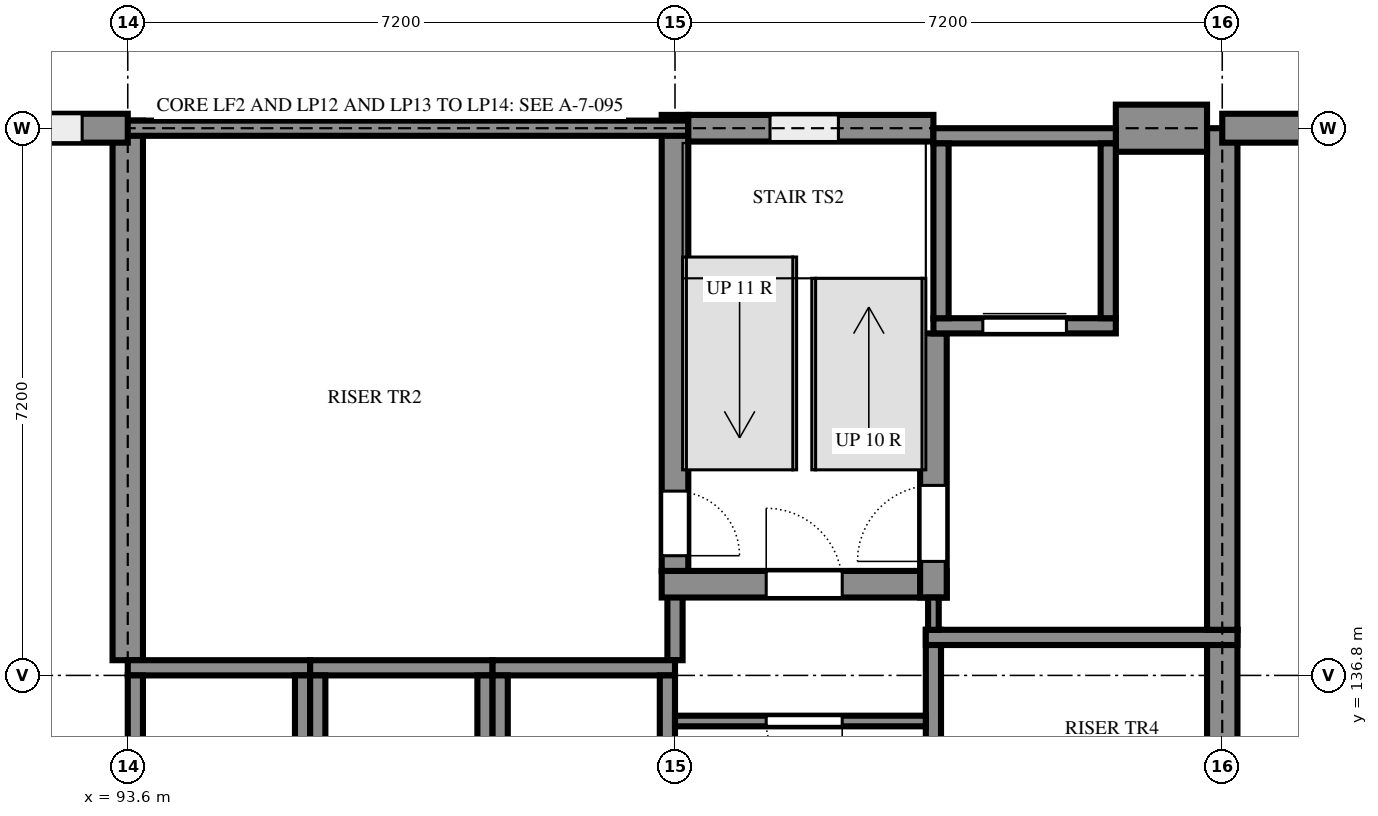
"""IFC4 building model, lengths in metres.
Left out: names, types, materials, properties, quantities, classifications, styles, units other than length and angle.
Written with IfcOpenShell. Run it as: python <this file> out.ifc"""

import sys

from ifc_helpers import new_model, si_unit, direction, frame, frame_2d, origin, place, context, subcontext, project, spatial, rectangle, extrude, element, fill, save


model = new_model("IFC4")
c1 = context("Model", 3, precision=1e-05, world=origin(), true_north=direction((0.0, 1.0)))
c2 = subcontext(c1, "Body", "Model", "MODEL_VIEW")
j1 = project(units=[si_unit("LENGTHUNIT", "METRE"), si_unit("PLANEANGLEUNIT", "RADIAN")], contexts=[c1])
p1 = place(None, origin())
s1 = spatial("IfcSite", under=j1, at=p1, CompositionType="ELEMENT")
p2 = place(p1, origin())
s2 = spatial("IfcBuilding", under=s1, at=p2, CompositionType="ELEMENT")
p3 = place(p2, frame((0.0, 0.0, 14.4)))
s3 = spatial("IfcBuildingStorey", under=s2, at=p3, CompositionType="ELEMENT", Elevation=14.4)
p4 = place(p3, frame((108.0, 134.5, 0.0), z_axis=(0.0, 0.0, 1.0), x_axis=(0.0, 1.0, 0.0)))
e1 = element("IfcWall", 1, at=p4, inside=s3, PredefinedType="SHEAR", context=c2, shape_type="SweptSolid", body=[
    extrude(rectangle(XDim=2.9, YDim=0.4, at=frame_2d((1.45, 0.0))), origin(), (0.0, 0.0, 1.0), 3.6),
])
p5 = place(p3, frame((100.8, 137.0, 0.0), z_axis=(0.0, 0.0, 1.0), x_axis=(0.0, 1.0, 0.0)))
e2 = element("IfcWall", 2, at=p5, inside=s3, PredefinedType="SHEAR", context=c2, shape_type="SweptSolid", body=[
    extrude(rectangle(XDim=1.175, YDim=0.2, at=frame_2d((0.587, 0.0))), origin(), (0.0, 0.0, 1.0), 3.6),
])
p6 = place(p3, frame((104.2, 137.4, 0.0), z_axis=(0.0, 0.0, 1.0), x_axis=(0.0, -1.0, 0.0)))
e3 = element("IfcWall", 3, at=p6, inside=s3, PredefinedType="SHEAR", context=c2, shape_type="SweptSolid", body=[
    extrude(rectangle(XDim=3.1, YDim=0.2, at=frame_2d((1.55, 0.0))), origin(), (0.0, 0.0, 1.0), 3.6),
])
p7 = place(p3, frame((108.2, 137.3, 0.0), z_axis=(0.0, 0.0, 1.0), x_axis=(-1.0, 0.0, 0.0)))
e4 = element("IfcWall", 4, at=p7, inside=s3, PredefinedType="SHEAR", context=c2, shape_type="SweptSolid", body=[
    extrude(rectangle(XDim=4.1, YDim=0.2, at=frame_2d((2.05, 0.0))), origin(), (0.0, 0.0, 1.0), 3.6),
])
p8 = place(p3, frame((108.0, 137.4, 0.0), z_axis=(0.0, 0.0, 1.0), x_axis=(0.0, 1.0, 0.0)))
e5 = element("IfcWall", 5, at=p8, inside=s3, PredefinedType="SHEAR", context=c2, shape_type="SweptSolid", body=[
    extrude(rectangle(XDim=6.6, YDim=0.4, at=frame_2d((3.3, 0.0))), origin(), (0.0, 0.0, 1.0), 3.6),
])
p9 = place(p3, frame((100.625, 138.0, 0.0), z_axis=(0.0, 0.0, 1.0), x_axis=(1.0, 0.0, 0.0)))
e6 = element("IfcWall", 6, at=p9, inside=s3, PredefinedType="SHEAR", context=c2, shape_type="SweptSolid", body=[
    extrude(rectangle(XDim=3.75, YDim=0.35, at=frame_2d((1.875, 0.0))), origin(), (0.0, 0.0, 1.0), 3.6),
])
p10 = place(p9, frame((1.375, 0.0, 0.0)))
e7 = element("IfcOpeningElement", 7, at=p10, cuts=e6, PredefinedType="OPENING", context=c2, shape_type="SweptSolid", body=[
    extrude(rectangle(XDim=1.0, YDim=2.1, at=frame_2d((0.5, 1.05))), frame((0.0, 0.185, 0.0), z_axis=(0.0, -1.0, 0.0), x_axis=(1.0, 0.0, 0.0)), (0.0, 0.0, 1.0), 0.37),
])
p11 = place(p3, frame((104.2, 137.825, 0.0), z_axis=(0.0, 0.0, 1.0), x_axis=(0.0, 1.0, 0.0)))
e8 = element("IfcWall", 8, at=p11, inside=s3, PredefinedType="SHEAR", context=c2, shape_type="SweptSolid", body=[
    extrude(rectangle(XDim=3.475, YDim=0.35, at=frame_2d((1.738, 0.0))), origin(), (0.0, 0.0, 1.0), 3.6),
])
p12 = place(p11, frame((0.475, 0.0, 0.0)))
e9 = element("IfcOpeningElement", 9, at=p12, cuts=e8, PredefinedType="OPENING", context=c2, shape_type="SweptSolid", body=[
    extrude(rectangle(XDim=1.0, YDim=2.1, at=frame_2d((0.5, 1.05))), frame((0.0, 0.185, 0.0), z_axis=(0.0, -1.0, 0.0), x_axis=(1.0, 0.0, 0.0)), (0.0, 0.0, 1.0), 0.37),
])
p13 = place(p3, frame((93.6, 144.1, 0.0), z_axis=(0.0, 0.0, 1.0), x_axis=(0.0, -1.0, 0.0)))
e10 = element("IfcWall", 10, at=p13, inside=s3, PredefinedType="SHEAR", context=c2, shape_type="SweptSolid", body=[
    extrude(rectangle(XDim=7.1, YDim=0.4, at=frame_2d((3.55, 0.0))), origin(), (0.0, 0.0, 1.0), 3.6),
])
p14 = place(p3, frame((100.8, 144.175, 0.0), z_axis=(0.0, 0.0, 1.0), x_axis=(0.0, -1.0, 0.0)))
e11 = element("IfcWall", 11, at=p14, inside=s3, PredefinedType="SHEAR", context=c2, shape_type="SweptSolid", body=[
    extrude(rectangle(XDim=6.0, YDim=0.35, at=frame_2d((3.0, 0.0))), origin(), (0.0, 0.0, 1.0), 3.6),
])
p15 = place(p14, frame((4.95, 0.0, 0.0)))
e12 = element("IfcOpeningElement", 12, at=p15, cuts=e11, PredefinedType="OPENING", context=c2, shape_type="SweptSolid", body=[
    extrude(rectangle(XDim=0.85, YDim=2.1, at=frame_2d((0.425, 1.05))), frame((0.0, 0.185, 0.0), z_axis=(0.0, -1.0, 0.0), x_axis=(1.0, 0.0, 0.0)), (0.0, 0.0, 1.0), 0.37),
])
p16 = place(p3, frame((100.975, 144.0, 0.0), z_axis=(0.0, 0.0, 1.0), x_axis=(-1.0, 0.0, 0.0)))
e13 = element("IfcWall", 13, at=p16, inside=s3, PredefinedType="SHEAR", context=c2, shape_type="SweptSolid", body=[
    extrude(rectangle(XDim=7.575, YDim=0.2, at=frame_2d((3.788, 0.0))), origin(), (0.0, 0.0, 1.0), 3.6),
])
p17 = place(p3, frame((104.2, 144.0, 0.0), z_axis=(0.0, 0.0, 1.0), x_axis=(-1.0, 0.0, 0.0)))
e14 = element("IfcWall", 14, at=p17, inside=s3, PredefinedType="SHEAR", context=c2, shape_type="SweptSolid", body=[
    extrude(rectangle(XDim=3.225, YDim=0.35, at=frame_2d((1.612, 0.0))), origin(), (0.0, 0.0, 1.0), 3.6),
])
p18 = place(p17, frame((1.25, 0.0, 0.6)))
e15 = element("IfcOpeningElement", 15, at=p18, cuts=e14, PredefinedType="OPENING", context=c2, shape_type="SweptSolid", body=[
    extrude(rectangle(XDim=0.9, YDim=2.1, at=frame_2d((0.45, 1.05))), frame((0.0, 0.185, 0.0), z_axis=(0.0, -1.0, 0.0), x_axis=(1.0, 0.0, 0.0)), (0.0, 0.0, 1.0), 0.37),
])
p19 = place(p3, frame((115.046, 144.0, 0.0), z_axis=(0.0, 0.0, 1.0), x_axis=(-1.0, 0.0, 0.0)))
e16 = element("IfcWall", 16, at=p19, inside=s3, PredefinedType="SOLIDWALL", context=c2, shape_type="SweptSolid", body=[
    extrude(rectangle(XDim=7.046, YDim=0.38, at=frame_2d((3.523, 0.0))), origin(), (0.0, 0.0, 1.0), 3.16),
])
p20 = place(p3, frame((107.8, 144.0, 0.0), z_axis=(0.0, 0.0, 1.0), x_axis=(-1.0, 0.0, 0.0)))
e17 = element("IfcWall", 17, at=p20, inside=s3, PredefinedType="SOLIDWALL", context=c2, shape_type="SweptSolid", body=[
    extrude(rectangle(XDim=1.2, YDim=0.62, at=frame_2d((0.6, 0.0))), origin(), (0.0, 0.0, 1.0), 3.46),
])
p21 = place(p3, frame((93.6, 144.0, 0.0), z_axis=(0.0, 0.0, 1.0), x_axis=(-1.0, 0.0, 0.0)))
e18 = element("IfcWall", 18, at=p21, inside=s3, PredefinedType="SOLIDWALL", context=c2, shape_type="SweptSolid", body=[
    extrude(rectangle(XDim=7.047, YDim=0.38, at=frame_2d((3.523, 0.0))), origin(), (0.0, 0.0, 1.0), 3.16),
])
p22 = place(p21, frame((4.2, 0.0, 0.6)))
e19 = element("IfcOpeningElement", 19, at=p22, cuts=e18, PredefinedType="OPENING", context=c2, shape_type="SweptSolid", body=[
    extrude(rectangle(XDim=2.4, YDim=2.4, at=frame_2d((1.2, 1.2))), frame((0.0, 0.2, 0.0), z_axis=(0.0, -1.0, 0.0), x_axis=(1.0, 0.0, 0.0)), (0.0, 0.0, 1.0), 0.4),
])
p23 = place(p21, frame((0.6, 0.0, 0.6)))
e20 = element("IfcOpeningElement", 20, at=p23, cuts=e18, PredefinedType="OPENING", context=c2, shape_type="SweptSolid", body=[
    extrude(rectangle(XDim=2.4, YDim=2.4, at=frame_2d((1.2, 1.2))), frame((0.0, 0.2, 0.0), z_axis=(0.0, -1.0, 0.0), x_axis=(1.0, 0.0, 0.0)), (0.0, 0.0, 1.0), 0.4),
])
p24 = place(p3, frame((93.6, 136.9, 0.0), z_axis=(0.0, 0.0, 1.0), x_axis=(1.0, 0.0, 0.0)))
e21 = element("IfcWall", 21, at=p24, inside=s3, PredefinedType="SHEAR", context=c2, shape_type="SweptSolid", body=[
    extrude(rectangle(XDim=2.4, YDim=0.2, at=frame_2d((1.2, 0.0))), origin(), (0.0, 0.0, 1.0), 3.6),
])
for number, where, z_axis, x_axis in (
    (22, (93.7, 134.6, 0.0), (0.0, 0.0, 1.0), (0.0, 1.0, 0.0)),
    (23, (95.9, 134.6, 0.0), (0.0, 0.0, 1.0), (0.0, 1.0, 0.0)),
):
    element("IfcWall", number, at=place(p3, frame(where, z_axis=z_axis, x_axis=x_axis)), inside=s3, PredefinedType="SHEAR", context=c2, shape_type="SweptSolid", body=[
        extrude(rectangle(XDim=2.2, YDim=0.2, at=frame_2d((1.1, 0.0))), origin(), (0.0, 0.0, 1.0), 3.6),
    ])
p25 = place(p3, frame((96.0, 136.9, 0.0), z_axis=(0.0, 0.0, 1.0), x_axis=(1.0, 0.0, 0.0)))
e24 = element("IfcWall", 24, at=p25, inside=s3, PredefinedType="SHEAR", context=c2, shape_type="SweptSolid", body=[
    extrude(rectangle(XDim=2.4, YDim=0.2, at=frame_2d((1.2, 0.0))), origin(), (0.0, 0.0, 1.0), 3.6),
])
for number, where, z_axis, x_axis in (
    (25, (96.1, 134.6, 0.0), (0.0, 0.0, 1.0), (0.0, 1.0, 0.0)),
    (26, (98.3, 134.6, 0.0), (0.0, 0.0, 1.0), (0.0, 1.0, 0.0)),
):
    element("IfcWall", number, at=place(p3, frame(where, z_axis=z_axis, x_axis=x_axis)), inside=s3, PredefinedType="SHEAR", context=c2, shape_type="SweptSolid", body=[
        extrude(rectangle(XDim=2.2, YDim=0.2, at=frame_2d((1.1, 0.0))), origin(), (0.0, 0.0, 1.0), 3.6),
    ])
p26 = place(p3, frame((98.4, 136.9, 0.0), z_axis=(0.0, 0.0, 1.0), x_axis=(1.0, 0.0, 0.0)))
e27 = element("IfcWall", 27, at=p26, inside=s3, PredefinedType="SHEAR", context=c2, shape_type="SweptSolid", body=[
    extrude(rectangle(XDim=2.4, YDim=0.2, at=frame_2d((1.2, 0.0))), origin(), (0.0, 0.0, 1.0), 3.6),
])
for number, where, z_axis, x_axis in (
    (28, (98.5, 134.6, 0.0), (0.0, 0.0, 1.0), (0.0, 1.0, 0.0)),
    (29, (100.7, 134.6, 0.0), (0.0, 0.0, 1.0), (0.0, 1.0, 0.0)),
):
    element("IfcWall", number, at=place(p3, frame(where, z_axis=z_axis, x_axis=x_axis)), inside=s3, PredefinedType="SHEAR", context=c2, shape_type="SweptSolid", body=[
        extrude(rectangle(XDim=2.2, YDim=0.2, at=frame_2d((1.1, 0.0))), origin(), (0.0, 0.0, 1.0), 3.6),
    ])
p27 = place(p3, frame((104.2, 141.4, 0.0), z_axis=(0.0, 0.0, 1.0), x_axis=(1.0, 0.0, 0.0)))
e30 = element("IfcWall", 30, at=p27, inside=s3, PredefinedType="SHEAR", context=c2, shape_type="SweptSolid", body=[
    extrude(rectangle(XDim=2.4, YDim=0.2, at=frame_2d((1.2, 0.0))), origin(), (0.0, 0.0, 1.0), 3.6),
])
p28 = place(p27, frame((0.65, 0.0, 0.0)))
e31 = element("IfcOpeningElement", 31, at=p28, cuts=e30, PredefinedType="OPENING", context=c2, shape_type="SweptSolid", body=[
    extrude(rectangle(XDim=1.1, YDim=2.1, at=frame_2d((0.55, 1.05))), frame((0.0, 0.11, 0.0), z_axis=(0.0, -1.0, 0.0), x_axis=(1.0, 0.0, 0.0)), (0.0, 0.0, 1.0), 0.22),
])
p29 = place(p3, frame((104.2, 143.9, 0.0), z_axis=(0.0, 0.0, 1.0), x_axis=(1.0, 0.0, 0.0)))
e32 = element("IfcWall", 32, at=p29, inside=s3, PredefinedType="SHEAR", context=c2, shape_type="SweptSolid", body=[
    extrude(rectangle(XDim=2.4, YDim=0.2, at=frame_2d((1.2, 0.0))), origin(), (0.0, 0.0, 1.0), 3.6),
])
for number, where, z_axis, x_axis in (
    (33, (104.3, 141.5, 0.0), (0.0, 0.0, 1.0), (0.0, 1.0, 0.0)),
    (34, (106.5, 141.5, 0.0), (0.0, 0.0, 1.0), (0.0, 1.0, 0.0)),
):
    element("IfcWall", number, at=place(p3, frame(where, z_axis=z_axis, x_axis=x_axis)), inside=s3, PredefinedType="SHEAR", context=c2, shape_type="SweptSolid", body=[
        extrude(rectangle(XDim=2.3, YDim=0.2, at=frame_2d((1.15, 0.0))), origin(), (0.0, 0.0, 1.0), 3.6),
    ])
p30 = place(p3, frame((100.8, 136.2, 0.0), z_axis=(0.0, 0.0, 1.0), x_axis=(1.0, 0.0, 0.0)))
e35 = element("IfcWall", 35, at=p30, inside=s3, PredefinedType="PARTITIONING", context=c2, shape_type="SweptSolid", body=[
    extrude(rectangle(XDim=3.3, YDim=0.14, at=frame_2d((1.65, 0.0))), origin(), (0.0, 0.0, 1.0), 3.42),
])
p31 = place(p30, frame((1.2, 0.0, 0.0)))
e36 = element("IfcOpeningElement", 36, at=p31, cuts=e35, PredefinedType="OPENING", context=c2, shape_type="SweptSolid", body=[
    extrude(rectangle(XDim=1.0, YDim=2.1, at=frame_2d((0.5, 1.05))), frame((0.0, 0.08, 0.0), z_axis=(0.0, -1.0, 0.0), x_axis=(1.0, 0.0, 0.0)), (0.0, 0.0, 1.0), 0.16),
])
p32 = place(p3, frame((104.2, 137.4, 0.0), z_axis=(0.0, 0.0, 1.0), x_axis=(0.0, 1.0, 0.0)))
e37 = element("IfcWall", 37, at=p32, inside=s3, PredefinedType="PARTITIONING", context=c2, shape_type="SweptSolid", body=[
    extrude(rectangle(XDim=0.425, YDim=0.14, at=frame_2d((0.212, 0.0))), origin(), (0.0, 0.0, 1.0), 3.42),
])
p33 = place(p23, origin())
e38 = element("IfcWindow", 38, at=p33, inside=s3, PartitioningType="SINGLE_PANEL", PredefinedType="WINDOW", context=c2, shape_type="SweptSolid", body=[
    extrude(rectangle(XDim=2.4, YDim=2.4, at=frame_2d((1.2, 1.2))), frame((0.0, 0.03, 0.0), z_axis=(0.0, -1.0, 0.0), x_axis=(1.0, 0.0, 0.0)), (0.0, 0.0, 1.0), 0.06),
])
fill(e20, e38)
p34 = place(p18, origin())
e39 = element("IfcWindow", 39, at=p34, inside=s3, PartitioningType="SINGLE_PANEL", PredefinedType="WINDOW", context=c2, shape_type="SweptSolid", body=[
    extrude(rectangle(XDim=0.9, YDim=2.1, at=frame_2d((0.45, 1.05))), frame((0.0, 0.03, 0.0), z_axis=(0.0, -1.0, 0.0), x_axis=(1.0, 0.0, 0.0)), (0.0, 0.0, 1.0), 0.06),
])
fill(e15, e39)
p35 = place(p28, origin())
e40 = element("IfcDoor", 40, at=p35, inside=s3, OperationType="SLIDING_TO_LEFT", PredefinedType="DOOR", context=c2, shape_type="SweptSolid", body=[
    extrude(rectangle(XDim=1.1, YDim=2.1, at=frame_2d((0.55, 1.05))), frame((0.0, 0.025, 0.0), z_axis=(0.0, -1.0, 0.0), x_axis=(1.0, 0.0, 0.0)), (0.0, 0.0, 1.0), 0.05),
])
fill(e31, e40)
p36 = place(p31, frame((1.0, 0.0, 0.0), z_axis=(0.0, 0.0, 1.0), x_axis=(-1.0, 0.0, 0.0)))
e41 = element("IfcDoor", 41, at=p36, inside=s3, OperationType="SINGLE_SWING_RIGHT", PredefinedType="DOOR", context=c2, shape_type="SweptSolid", body=[
    extrude(rectangle(XDim=1.0, YDim=2.1, at=frame_2d((0.5, 1.05))), frame((0.0, 0.025, 0.0), z_axis=(0.0, -1.0, 0.0), x_axis=(1.0, 0.0, 0.0)), (0.0, 0.0, 1.0), 0.05),
])
fill(e36, e41)
p37 = place(p10, origin())
e42 = element("IfcDoor", 42, at=p37, inside=s3, OperationType="SINGLE_SWING_RIGHT", PredefinedType="DOOR", context=c2, shape_type="SweptSolid", body=[
    extrude(rectangle(XDim=1.0, YDim=2.1, at=frame_2d((0.5, 1.05))), frame((0.0, 0.025, 0.0), z_axis=(0.0, -1.0, 0.0), x_axis=(1.0, 0.0, 0.0)), (0.0, 0.0, 1.0), 0.05),
])
fill(e7, e42)
p38 = place(p15, origin())
e43 = element("IfcDoor", 43, at=p38, inside=s3, OperationType="SINGLE_SWING_LEFT", PredefinedType="DOOR", context=c2, shape_type="SweptSolid", body=[
    extrude(rectangle(XDim=0.85, YDim=2.1, at=frame_2d((0.425, 1.05))), frame((0.0, 0.025, 0.0), z_axis=(0.0, -1.0, 0.0), x_axis=(1.0, 0.0, 0.0)), (0.0, 0.0, 1.0), 0.05),
])
fill(e12, e43)
p39 = place(p12, origin())
e44 = element("IfcDoor", 44, at=p39, inside=s3, OperationType="SINGLE_SWING_RIGHT", PredefinedType="DOOR", context=c2, shape_type="SweptSolid", body=[
    extrude(rectangle(XDim=1.0, YDim=2.1, at=frame_2d((0.5, 1.05))), frame((0.0, 0.025, 0.0), z_axis=(0.0, -1.0, 0.0), x_axis=(1.0, 0.0, 0.0)), (0.0, 0.0, 1.0), 0.05),
])
fill(e9, e44)
save(model, sys.argv[1])
